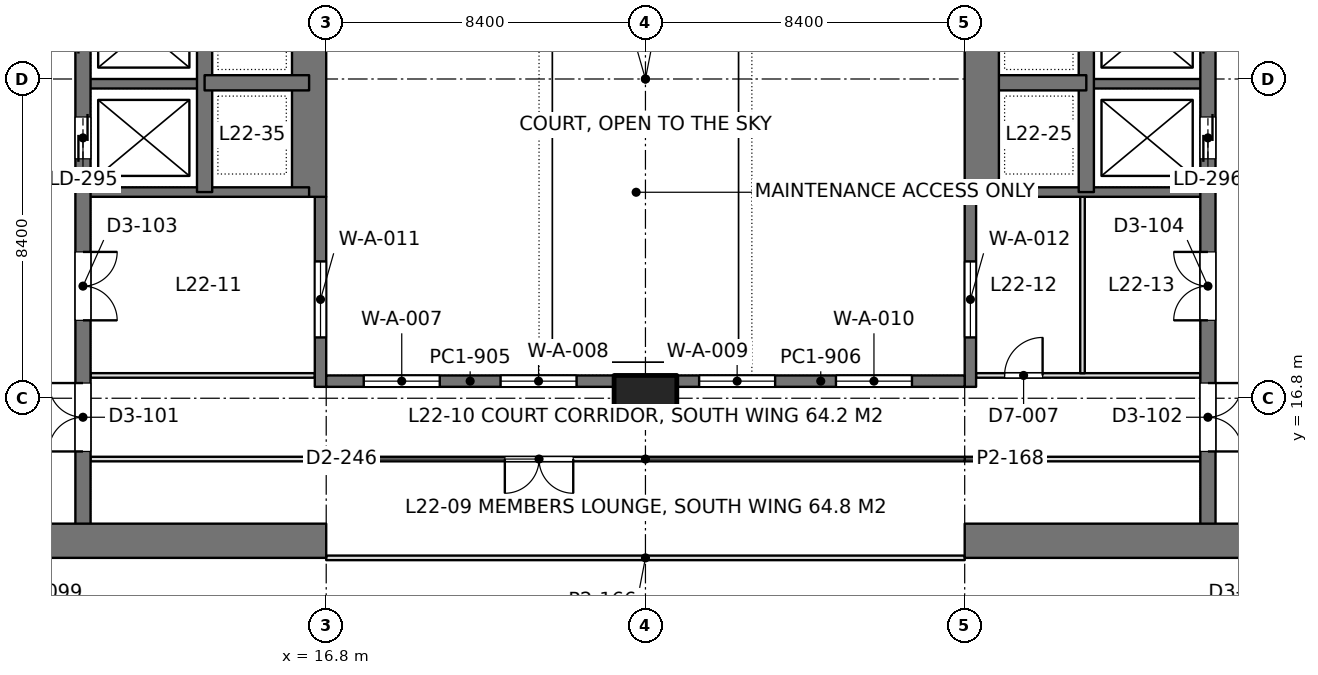
"""IFC4 building model, lengths in metres.
Left out: names, types, materials, properties, quantities, classifications, styles, units other than length and angle.
Written with IfcOpenShell. Run it as: python <this file> out.ifc"""

import sys

from ifc_helpers import new_model, si_unit, direction, frame, frame_2d, origin, origin_2d, place, context, subcontext, project, spatial, rectangle, extrude, element, fill, save


model = new_model("IFC4")
c1 = context("Model", 3, precision=1e-05, world=origin(), true_north=direction((0.0, 1.0)))
c2 = subcontext(c1, "Body", "Model", "MODEL_VIEW")
j1 = project(units=[si_unit("LENGTHUNIT", "METRE"), si_unit("PLANEANGLEUNIT", "RADIAN")], contexts=[c1])
p1 = place(None, origin())
s1 = spatial("IfcSite", under=j1, at=p1, CompositionType="ELEMENT")
p2 = place(p1, origin())
s2 = spatial("IfcBuilding", under=s1, at=p2, CompositionType="ELEMENT")
p3 = place(p2, frame((0.0, 0.0, 100.8)))
s3 = spatial("IfcBuildingStorey", under=s2, at=p3, CompositionType="ELEMENT", Elevation=100.8)
p4 = place(p3, frame((25.2, 16.8, 0.0), z_axis=(0.0, 0.0, 1.0), x_axis=(1.0, 0.0, 0.0)))
e1 = element("IfcColumn", 1, at=p4, inside=s3, PredefinedType="COLUMN", context=c2, shape_type="SweptSolid", body=[
    extrude(rectangle(XDim=1.65, YDim=1.2, at=origin_2d()), origin(), (0.0, 0.0, 1.0), 4.2),
])
p5 = place(p3, frame((-1.2, 13.05, 0.0), z_axis=(0.0, 0.0, 1.0), x_axis=(1.0, 0.0, 0.0)))
e2 = element("IfcWall", 2, at=p5, inside=s3, PredefinedType="SHEAR", context=c2, shape_type="SweptSolid", body=[
    extrude(rectangle(XDim=18.0, YDim=0.9, at=frame_2d((9.0, 0.0))), origin(), (0.0, 0.0, 1.0), 4.2),
])
p6 = place(p5, frame((8.95, 0.0, 0.0)))
e3 = element("IfcOpeningElement", 3, at=p6, cuts=e2, PredefinedType="OPENING", context=c2, shape_type="SweptSolid", body=[
    extrude(rectangle(XDim=1.8, YDim=2.4, at=frame_2d((0.9, 1.2))), frame((0.0, 0.46, 0.0), z_axis=(0.0, -1.0, 0.0), x_axis=(1.0, 0.0, 0.0)), (0.0, 0.0, 1.0), 0.92),
])
p7 = place(p3, frame((16.35, 22.1, 0.0), z_axis=(0.0, 0.0, 1.0), x_axis=(0.0, 1.0, 0.0)))
e4 = element("IfcWall", 4, at=p7, inside=s3, PredefinedType="SHEAR", context=c2, shape_type="SweptSolid", body=[
    extrude(rectangle(XDim=15.25, YDim=0.9, at=frame_2d((7.625, 0.0))), origin(), (0.0, 0.0, 1.0), 4.2),
])
p8 = place(p3, frame((10.4, 13.05, 0.0), z_axis=(0.0, 0.0, 1.0), x_axis=(0.0, 1.0, 0.0)))
e5 = element("IfcWall", 5, at=p8, inside=s3, PredefinedType="SHEAR", context=c2, shape_type="SweptSolid", body=[
    extrude(rectangle(XDim=24.3, YDim=0.4, at=frame_2d((12.15, 0.0))), origin(), (0.0, 0.0, 1.0), 4.2),
])
p9 = place(p8, frame((10.05, 0.0, 0.0)))
e6 = element("IfcOpeningElement", 6, at=p9, cuts=e5, PredefinedType="OPENING", context=c2, shape_type="SweptSolid", body=[
    extrude(rectangle(XDim=1.1, YDim=2.2, at=frame_2d((0.55, 1.1))), frame((0.0, 0.21, 0.0), z_axis=(0.0, -1.0, 0.0), x_axis=(1.0, 0.0, 0.0)), (0.0, 0.0, 1.0), 0.42),
])
p10 = place(p8, frame((12.9, 0.0, 0.0)))
e7 = element("IfcOpeningElement", 7, at=p10, cuts=e5, PredefinedType="OPENING", context=c2, shape_type="SweptSolid", body=[
    extrude(rectangle(XDim=1.1, YDim=2.2, at=frame_2d((0.55, 1.1))), frame((0.0, 0.21, 0.0), z_axis=(0.0, -1.0, 0.0), x_axis=(1.0, 0.0, 0.0)), (0.0, 0.0, 1.0), 0.42),
])
p11 = place(p8, frame((21.45, 0.0, 0.0)))
e8 = element("IfcOpeningElement", 8, at=p11, cuts=e5, PredefinedType="OPENING", context=c2, shape_type="SweptSolid", body=[
    extrude(rectangle(XDim=1.1, YDim=2.2, at=frame_2d((0.55, 1.1))), frame((0.0, 0.21, 0.0), z_axis=(0.0, -1.0, 0.0), x_axis=(1.0, 0.0, 0.0)), (0.0, 0.0, 1.0), 0.42),
])
p12 = place(p8, frame((2.35, 0.0, 0.0)))
e9 = element("IfcOpeningElement", 9, at=p12, cuts=e5, PredefinedType="OPENING", context=c2, shape_type="SweptSolid", body=[
    extrude(rectangle(XDim=1.8, YDim=2.4, at=frame_2d((0.9, 1.2))), frame((0.0, 0.21, 0.0), z_axis=(0.0, -1.0, 0.0), x_axis=(1.0, 0.0, 0.0)), (0.0, 0.0, 1.0), 0.42),
])
p13 = place(p8, frame((5.8, 0.0, 0.0)))
e10 = element("IfcOpeningElement", 10, at=p13, cuts=e5, PredefinedType="OPENING", context=c2, shape_type="SweptSolid", body=[
    extrude(rectangle(XDim=1.8, YDim=2.4, at=frame_2d((0.9, 1.2))), frame((0.0, 0.21, 0.0), z_axis=(0.0, -1.0, 0.0), x_axis=(1.0, 0.0, 0.0)), (0.0, 0.0, 1.0), 0.42),
])
p14 = place(p3, frame((13.6, 22.225, 0.0), z_axis=(0.0, 0.0, 1.0), x_axis=(0.0, 1.0, 0.0)))
e11 = element("IfcWall", 11, at=p14, inside=s3, PredefinedType="SHEAR", context=c2, shape_type="SweptSolid", body=[
    extrude(rectangle(XDim=15.125, YDim=0.4, at=frame_2d((7.562, 0.0))), origin(), (0.0, 0.0, 1.0), 4.2),
])
p15 = place(p3, frame((13.6, 25.1, 0.0), z_axis=(0.0, 0.0, 1.0), x_axis=(1.0, 0.0, 0.0)))
e12 = element("IfcWall", 12, at=p15, inside=s3, PredefinedType="SHEAR", context=c2, shape_type="SweptSolid", body=[
    extrude(rectangle(XDim=2.75, YDim=0.4, at=frame_2d((1.375, 0.0))), origin(), (0.0, 0.0, 1.0), 4.2),
])
p16 = place(p3, frame((10.4, 22.225, 0.0), z_axis=(0.0, 0.0, 1.0), x_axis=(1.0, 0.0, 0.0)))
e13 = element("IfcWall", 13, at=p16, inside=s3, PredefinedType="SHEAR", context=c2, shape_type="SweptSolid", body=[
    extrude(rectangle(XDim=5.95, YDim=0.25, at=frame_2d((2.975, 0.0))), origin(), (0.0, 0.0, 1.0), 4.2),
])
p17 = place(p3, frame((10.4, 25.075, 0.0), z_axis=(0.0, 0.0, 1.0), x_axis=(1.0, 0.0, 0.0)))
e14 = element("IfcWall", 14, at=p17, inside=s3, PredefinedType="SHEAR", context=c2, shape_type="SweptSolid", body=[
    extrude(rectangle(XDim=3.2, YDim=0.25, at=frame_2d((1.6, 0.0))), origin(), (0.0, 0.0, 1.0), 4.2),
])
p18 = place(p3, frame((33.6, 13.05, 0.0), z_axis=(0.0, 0.0, 1.0), x_axis=(1.0, 0.0, 0.0)))
e15 = element("IfcWall", 15, at=p18, inside=s3, PredefinedType="SHEAR", context=c2, shape_type="SweptSolid", body=[
    extrude(rectangle(XDim=18.0, YDim=0.9, at=frame_2d((9.0, 0.0))), origin(), (0.0, 0.0, 1.0), 4.2),
])
p19 = place(p18, frame((7.25, 0.0, 0.0)))
e16 = element("IfcOpeningElement", 16, at=p19, cuts=e15, PredefinedType="OPENING", context=c2, shape_type="SweptSolid", body=[
    extrude(rectangle(XDim=1.8, YDim=2.4, at=frame_2d((0.9, 1.2))), frame((0.0, 0.46, 0.0), z_axis=(0.0, -1.0, 0.0), x_axis=(1.0, 0.0, 0.0)), (0.0, 0.0, 1.0), 0.92),
])
p20 = place(p3, frame((34.05, 22.1, 0.0), z_axis=(0.0, 0.0, 1.0), x_axis=(0.0, 1.0, 0.0)))
e17 = element("IfcWall", 17, at=p20, inside=s3, PredefinedType="SHEAR", context=c2, shape_type="SweptSolid", body=[
    extrude(rectangle(XDim=15.25, YDim=0.9, at=frame_2d((7.625, 0.0))), origin(), (0.0, 0.0, 1.0), 4.2),
])
p21 = place(p3, frame((40.0, 13.05, 0.0), z_axis=(0.0, 0.0, 1.0), x_axis=(0.0, 1.0, 0.0)))
e18 = element("IfcWall", 18, at=p21, inside=s3, PredefinedType="SHEAR", context=c2, shape_type="SweptSolid", body=[
    extrude(rectangle(XDim=24.3, YDim=0.4, at=frame_2d((12.15, 0.0))), origin(), (0.0, 0.0, 1.0), 4.2),
])
p22 = place(p21, frame((10.05, 0.0, 0.0)))
e19 = element("IfcOpeningElement", 19, at=p22, cuts=e18, PredefinedType="OPENING", context=c2, shape_type="SweptSolid", body=[
    extrude(rectangle(XDim=1.1, YDim=2.2, at=frame_2d((0.55, 1.1))), frame((0.0, 0.21, 0.0), z_axis=(0.0, -1.0, 0.0), x_axis=(1.0, 0.0, 0.0)), (0.0, 0.0, 1.0), 0.42),
])
p23 = place(p21, frame((12.9, 0.0, 0.0)))
e20 = element("IfcOpeningElement", 20, at=p23, cuts=e18, PredefinedType="OPENING", context=c2, shape_type="SweptSolid", body=[
    extrude(rectangle(XDim=1.1, YDim=2.2, at=frame_2d((0.55, 1.1))), frame((0.0, 0.21, 0.0), z_axis=(0.0, -1.0, 0.0), x_axis=(1.0, 0.0, 0.0)), (0.0, 0.0, 1.0), 0.42),
])
p24 = place(p21, frame((21.45, 0.0, 0.0)))
e21 = element("IfcOpeningElement", 21, at=p24, cuts=e18, PredefinedType="OPENING", context=c2, shape_type="SweptSolid", body=[
    extrude(rectangle(XDim=1.1, YDim=2.2, at=frame_2d((0.55, 1.1))), frame((0.0, 0.21, 0.0), z_axis=(0.0, -1.0, 0.0), x_axis=(1.0, 0.0, 0.0)), (0.0, 0.0, 1.0), 0.42),
])
p25 = place(p21, frame((2.35, 0.0, 0.0)))
e22 = element("IfcOpeningElement", 22, at=p25, cuts=e18, PredefinedType="OPENING", context=c2, shape_type="SweptSolid", body=[
    extrude(rectangle(XDim=1.8, YDim=2.4, at=frame_2d((0.9, 1.2))), frame((0.0, 0.21, 0.0), z_axis=(0.0, -1.0, 0.0), x_axis=(1.0, 0.0, 0.0)), (0.0, 0.0, 1.0), 0.42),
])
p26 = place(p21, frame((5.8, 0.0, 0.0)))
e23 = element("IfcOpeningElement", 23, at=p26, cuts=e18, PredefinedType="OPENING", context=c2, shape_type="SweptSolid", body=[
    extrude(rectangle(XDim=1.8, YDim=2.4, at=frame_2d((0.9, 1.2))), frame((0.0, 0.21, 0.0), z_axis=(0.0, -1.0, 0.0), x_axis=(1.0, 0.0, 0.0)), (0.0, 0.0, 1.0), 0.42),
])
p27 = place(p3, frame((36.8, 22.225, 0.0), z_axis=(0.0, 0.0, 1.0), x_axis=(0.0, 1.0, 0.0)))
e24 = element("IfcWall", 24, at=p27, inside=s3, PredefinedType="SHEAR", context=c2, shape_type="SweptSolid", body=[
    extrude(rectangle(XDim=15.125, YDim=0.4, at=frame_2d((7.562, 0.0))), origin(), (0.0, 0.0, 1.0), 4.2),
])
p28 = place(p3, frame((36.8, 25.1, 0.0), z_axis=(0.0, 0.0, 1.0), x_axis=(-1.0, 0.0, 0.0)))
e25 = element("IfcWall", 25, at=p28, inside=s3, PredefinedType="SHEAR", context=c2, shape_type="SweptSolid", body=[
    extrude(rectangle(XDim=2.75, YDim=0.4, at=frame_2d((1.375, 0.0))), origin(), (0.0, 0.0, 1.0), 4.2),
])
p29 = place(p3, frame((40.0, 22.225, 0.0), z_axis=(0.0, 0.0, 1.0), x_axis=(-1.0, 0.0, 0.0)))
e26 = element("IfcWall", 26, at=p29, inside=s3, PredefinedType="SHEAR", context=c2, shape_type="SweptSolid", body=[
    extrude(rectangle(XDim=5.95, YDim=0.25, at=frame_2d((2.975, 0.0))), origin(), (0.0, 0.0, 1.0), 4.2),
])
p30 = place(p3, frame((40.0, 25.075, 0.0), z_axis=(0.0, 0.0, 1.0), x_axis=(-1.0, 0.0, 0.0)))
e27 = element("IfcWall", 27, at=p30, inside=s3, PredefinedType="SHEAR", context=c2, shape_type="SweptSolid", body=[
    extrude(rectangle(XDim=3.2, YDim=0.25, at=frame_2d((1.6, 0.0))), origin(), (0.0, 0.0, 1.0), 4.2),
])
p31 = place(p3, frame((16.65, 17.1, 0.0), z_axis=(0.0, 0.0, 1.0), x_axis=(0.0, 1.0, 0.0)))
e28 = element("IfcWall", 28, at=p31, inside=s3, PredefinedType="SOLIDWALL", context=c2, shape_type="SweptSolid", body=[
    extrude(rectangle(XDim=5.0, YDim=0.3, at=frame_2d((2.5, 0.0))), origin(), (0.0, 0.0, 1.0), 4.05),
])
p32 = place(p31, frame((1.3, 0.0, 0.1)))
e29 = element("IfcOpeningElement", 29, at=p32, cuts=e28, PredefinedType="OPENING", context=c2, shape_type="SweptSolid", body=[
    extrude(rectangle(XDim=2.0, YDim=3.0, at=frame_2d((1.0, 1.5))), frame((0.0, 0.16, 0.0), z_axis=(0.0, -1.0, 0.0), x_axis=(1.0, 0.0, 0.0)), (0.0, 0.0, 1.0), 0.32),
])
p33 = place(p3, frame((33.75, 17.1, 0.0), z_axis=(0.0, 0.0, 1.0), x_axis=(0.0, 1.0, 0.0)))
e30 = element("IfcWall", 30, at=p33, inside=s3, PredefinedType="SOLIDWALL", context=c2, shape_type="SweptSolid", body=[
    extrude(rectangle(XDim=5.0, YDim=0.3, at=frame_2d((2.5, 0.0))), origin(), (0.0, 0.0, 1.0), 4.05),
])
p34 = place(p33, frame((1.3, 0.0, 0.1)))
e31 = element("IfcOpeningElement", 31, at=p34, cuts=e30, PredefinedType="OPENING", context=c2, shape_type="SweptSolid", body=[
    extrude(rectangle(XDim=2.0, YDim=3.0, at=frame_2d((1.0, 1.5))), frame((0.0, 0.16, 0.0), z_axis=(0.0, -1.0, 0.0), x_axis=(1.0, 0.0, 0.0)), (0.0, 0.0, 1.0), 0.32),
])
p35 = place(p3, frame((16.8, 17.25, 0.0), z_axis=(0.0, 0.0, 1.0), x_axis=(1.0, 0.0, 0.0)))
e32 = element("IfcWall", 32, at=p35, inside=s3, PredefinedType="SOLIDWALL", context=c2, shape_type="SweptSolid", body=[
    extrude(rectangle(XDim=7.575, YDim=0.3, at=frame_2d((3.788, 0.0))), origin(), (0.0, 0.0, 1.0), 4.05),
])
p36 = place(p35, frame((0.988, 0.0, 0.1)))
e33 = element("IfcOpeningElement", 33, at=p36, cuts=e32, PredefinedType="OPENING", context=c2, shape_type="SweptSolid", body=[
    extrude(rectangle(XDim=2.0, YDim=3.0, at=frame_2d((1.0, 1.5))), frame((0.0, 0.16, 0.0), z_axis=(0.0, -1.0, 0.0), x_axis=(1.0, 0.0, 0.0)), (0.0, 0.0, 1.0), 0.32),
])
p37 = place(p35, frame((4.587, 0.0, 0.1)))
e34 = element("IfcOpeningElement", 34, at=p37, cuts=e32, PredefinedType="OPENING", context=c2, shape_type="SweptSolid", body=[
    extrude(rectangle(XDim=2.0, YDim=3.0, at=frame_2d((1.0, 1.5))), frame((0.0, 0.16, 0.0), z_axis=(0.0, -1.0, 0.0), x_axis=(1.0, 0.0, 0.0)), (0.0, 0.0, 1.0), 0.32),
])
p38 = place(p3, frame((26.025, 17.25, 0.0), z_axis=(0.0, 0.0, 1.0), x_axis=(1.0, 0.0, 0.0)))
e35 = element("IfcWall", 35, at=p38, inside=s3, PredefinedType="SOLIDWALL", context=c2, shape_type="SweptSolid", body=[
    extrude(rectangle(XDim=7.575, YDim=0.3, at=frame_2d((3.788, 0.0))), origin(), (0.0, 0.0, 1.0), 4.05),
])
p39 = place(p38, frame((0.587, 0.0, 0.1)))
e36 = element("IfcOpeningElement", 36, at=p39, cuts=e35, PredefinedType="OPENING", context=c2, shape_type="SweptSolid", body=[
    extrude(rectangle(XDim=2.0, YDim=3.0, at=frame_2d((1.0, 1.5))), frame((0.0, 0.16, 0.0), z_axis=(0.0, -1.0, 0.0), x_axis=(1.0, 0.0, 0.0)), (0.0, 0.0, 1.0), 0.32),
])
p40 = place(p38, frame((4.188, 0.0, 0.1)))
e37 = element("IfcOpeningElement", 37, at=p40, cuts=e35, PredefinedType="OPENING", context=c2, shape_type="SweptSolid", body=[
    extrude(rectangle(XDim=2.0, YDim=3.0, at=frame_2d((1.0, 1.5))), frame((0.0, 0.16, 0.0), z_axis=(0.0, -1.0, 0.0), x_axis=(1.0, 0.0, 0.0)), (0.0, 0.0, 1.0), 0.32),
])
p41 = place(p3, frame((10.598, 17.4, 0.0), z_axis=(0.0, 0.0, 1.0), x_axis=(1.0, 0.0, 0.0)))
e38 = element("IfcWall", 38, at=p41, inside=s3, PredefinedType="PARTITIONING", context=c2, shape_type="SweptSolid", body=[
    extrude(rectangle(XDim=5.904, YDim=0.12, at=frame_2d((2.952, 0.0))), origin(), (0.0, 0.0, 1.0), 3.55),
])
p42 = place(p3, frame((33.898, 17.4, 0.0), z_axis=(0.0, 0.0, 1.0), x_axis=(1.0, 0.0, 0.0)))
e39 = element("IfcWall", 39, at=p42, inside=s3, PredefinedType="PARTITIONING", context=c2, shape_type="SweptSolid", body=[
    extrude(rectangle(XDim=5.904, YDim=0.12, at=frame_2d((2.952, 0.0))), origin(), (0.0, 0.0, 1.0), 3.55),
])
p43 = place(p42, frame((0.752, 0.0, 0.0)))
e40 = element("IfcOpeningElement", 40, at=p43, cuts=e39, PredefinedType="OPENING", context=c2, shape_type="SweptSolid", body=[
    extrude(rectangle(XDim=1.0, YDim=2.4, at=frame_2d((0.5, 1.2))), frame((0.0, 0.07, 0.0), z_axis=(0.0, -1.0, 0.0), x_axis=(1.0, 0.0, 0.0)), (0.0, 0.0, 1.0), 0.14),
])
p44 = place(p3, frame((36.7, 17.458, 0.0), z_axis=(0.0, 0.0, 1.0), x_axis=(0.0, 1.0, 0.0)))
e41 = element("IfcWall", 41, at=p44, inside=s3, PredefinedType="PARTITIONING", context=c2, shape_type="SweptSolid", body=[
    extrude(rectangle(XDim=4.644, YDim=0.12, at=frame_2d((2.322, 0.0))), origin(), (0.0, 0.0, 1.0), 3.6),
])
for number, where, z_axis, x_axis in (
    (42, (10.598, 15.2, 0.0), (0.0, 0.0, 1.0), (1.0, 0.0, 0.0)),
    (43, (33.598, 15.2, 0.0), (0.0, 0.0, 1.0), (1.0, 0.0, 0.0)),
):
    element("IfcWall", number, at=place(p3, frame(where, z_axis=z_axis, x_axis=x_axis)), inside=s3, PredefinedType="PARTITIONING", context=c2, shape_type="SweptSolid", body=[
        extrude(rectangle(XDim=6.204, YDim=0.12, at=frame_2d((3.102, 0.0))), origin(), (0.0, 0.0, 1.0), 3.55),
    ])
p45 = place(p3, frame((16.798, 15.2, 0.0), z_axis=(0.0, 0.0, 1.0), x_axis=(1.0, 0.0, 0.0)))
e44 = element("IfcWall", 44, at=p45, inside=s3, PredefinedType="PARTITIONING", context=c2, shape_type="SweptSolid", body=[
    extrude(rectangle(XDim=16.804, YDim=0.12, at=frame_2d((8.402, 0.0))), origin(), (0.0, 0.0, 1.0), 3.55),
])
p46 = place(p45, frame((4.702, 0.0, 0.0)))
e45 = element("IfcOpeningElement", 45, at=p46, cuts=e44, PredefinedType="OPENING", context=c2, shape_type="SweptSolid", body=[
    extrude(rectangle(XDim=1.8, YDim=2.2, at=frame_2d((0.9, 1.1))), frame((0.0, 0.07, 0.0), z_axis=(0.0, -1.0, 0.0), x_axis=(1.0, 0.0, 0.0)), (0.0, 0.0, 1.0), 0.14),
])
p47 = place(p3, frame((16.8, 12.6, 0.0), z_axis=(0.0, 0.0, 1.0), x_axis=(1.0, 0.0, 0.0)))
e46 = element("IfcWall", 46, at=p47, inside=s3, PredefinedType="PARTITIONING", context=c2, shape_type="SweptSolid", body=[
    extrude(rectangle(XDim=16.8, YDim=0.12, at=frame_2d((8.4, 0.0))), origin(), (0.0, 0.0, 1.0), 3.55),
])
p48 = place(p32, origin())
e47 = element("IfcWindow", 47, at=p48, inside=s3, PartitioningType="SINGLE_PANEL", PredefinedType="WINDOW", context=c2, shape_type="SweptSolid", body=[
    extrude(rectangle(XDim=2.0, YDim=3.0, at=frame_2d((1.0, 1.5))), frame((0.0, 0.03, 0.0), z_axis=(0.0, -1.0, 0.0), x_axis=(1.0, 0.0, 0.0)), (0.0, 0.0, 1.0), 0.06),
])
fill(e29, e47)
p49 = place(p34, origin())
e48 = element("IfcWindow", 48, at=p49, inside=s3, PartitioningType="SINGLE_PANEL", PredefinedType="WINDOW", context=c2, shape_type="SweptSolid", body=[
    extrude(rectangle(XDim=2.0, YDim=3.0, at=frame_2d((1.0, 1.5))), frame((0.0, 0.03, 0.0), z_axis=(0.0, -1.0, 0.0), x_axis=(1.0, 0.0, 0.0)), (0.0, 0.0, 1.0), 0.06),
])
fill(e31, e48)
p50 = place(p36, origin())
e49 = element("IfcWindow", 49, at=p50, inside=s3, PartitioningType="SINGLE_PANEL", PredefinedType="WINDOW", context=c2, shape_type="SweptSolid", body=[
    extrude(rectangle(XDim=2.0, YDim=3.0, at=frame_2d((1.0, 1.5))), frame((0.0, 0.03, 0.0), z_axis=(0.0, -1.0, 0.0), x_axis=(1.0, 0.0, 0.0)), (0.0, 0.0, 1.0), 0.06),
])
fill(e33, e49)
p51 = place(p37, origin())
e50 = element("IfcWindow", 50, at=p51, inside=s3, PartitioningType="SINGLE_PANEL", PredefinedType="WINDOW", context=c2, shape_type="SweptSolid", body=[
    extrude(rectangle(XDim=2.0, YDim=3.0, at=frame_2d((1.0, 1.5))), frame((0.0, 0.03, 0.0), z_axis=(0.0, -1.0, 0.0), x_axis=(1.0, 0.0, 0.0)), (0.0, 0.0, 1.0), 0.06),
])
fill(e34, e50)
p52 = place(p39, origin())
e51 = element("IfcWindow", 51, at=p52, inside=s3, PartitioningType="SINGLE_PANEL", PredefinedType="WINDOW", context=c2, shape_type="SweptSolid", body=[
    extrude(rectangle(XDim=2.0, YDim=3.0, at=frame_2d((1.0, 1.5))), frame((0.0, 0.03, 0.0), z_axis=(0.0, -1.0, 0.0), x_axis=(1.0, 0.0, 0.0)), (0.0, 0.0, 1.0), 0.06),
])
fill(e36, e51)
p53 = place(p40, origin())
e52 = element("IfcWindow", 52, at=p53, inside=s3, PartitioningType="SINGLE_PANEL", PredefinedType="WINDOW", context=c2, shape_type="SweptSolid", body=[
    extrude(rectangle(XDim=2.0, YDim=3.0, at=frame_2d((1.0, 1.5))), frame((0.0, 0.03, 0.0), z_axis=(0.0, -1.0, 0.0), x_axis=(1.0, 0.0, 0.0)), (0.0, 0.0, 1.0), 0.06),
])
fill(e37, e52)
p54 = place(p9, origin())
e53 = element("IfcDoor", 53, at=p54, inside=s3, OperationType="DOUBLE_DOOR_SLIDING", PredefinedType="DOOR", context=c2, shape_type="SweptSolid", body=[
    extrude(rectangle(XDim=1.1, YDim=2.2, at=frame_2d((0.55, 1.1))), frame((0.0, 0.025, 0.0), z_axis=(0.0, -1.0, 0.0), x_axis=(1.0, 0.0, 0.0)), (0.0, 0.0, 1.0), 0.05),
])
fill(e6, e53)
p55 = place(p12, origin())
e54 = element("IfcDoor", 54, at=p55, inside=s3, OperationType="DOUBLE_DOOR_SINGLE_SWING", PredefinedType="DOOR", context=c2, shape_type="SweptSolid", body=[
    extrude(rectangle(XDim=1.8, YDim=2.4, at=frame_2d((0.9, 1.2))), frame((0.0, 0.025, 0.0), z_axis=(0.0, -1.0, 0.0), x_axis=(1.0, 0.0, 0.0)), (0.0, 0.0, 1.0), 0.05),
])
fill(e9, e54)
p56 = place(p13, frame((1.8, 0.0, 0.0), z_axis=(0.0, 0.0, 1.0), x_axis=(-1.0, 0.0, 0.0)))
e55 = element("IfcDoor", 55, at=p56, inside=s3, OperationType="DOUBLE_DOOR_SINGLE_SWING", PredefinedType="DOOR", context=c2, shape_type="SweptSolid", body=[
    extrude(rectangle(XDim=1.8, YDim=2.4, at=frame_2d((0.9, 1.2))), frame((0.0, 0.025, 0.0), z_axis=(0.0, -1.0, 0.0), x_axis=(1.0, 0.0, 0.0)), (0.0, 0.0, 1.0), 0.05),
])
fill(e10, e55)
p57 = place(p22, origin())
e56 = element("IfcDoor", 56, at=p57, inside=s3, OperationType="DOUBLE_DOOR_SLIDING", PredefinedType="DOOR", context=c2, shape_type="SweptSolid", body=[
    extrude(rectangle(XDim=1.1, YDim=2.2, at=frame_2d((0.55, 1.1))), frame((0.0, 0.025, 0.0), z_axis=(0.0, -1.0, 0.0), x_axis=(1.0, 0.0, 0.0)), (0.0, 0.0, 1.0), 0.05),
])
fill(e19, e56)
p58 = place(p25, frame((1.8, 0.0, 0.0), z_axis=(0.0, 0.0, 1.0), x_axis=(-1.0, 0.0, 0.0)))
e57 = element("IfcDoor", 57, at=p58, inside=s3, OperationType="DOUBLE_DOOR_SINGLE_SWING", PredefinedType="DOOR", context=c2, shape_type="SweptSolid", body=[
    extrude(rectangle(XDim=1.8, YDim=2.4, at=frame_2d((0.9, 1.2))), frame((0.0, 0.025, 0.0), z_axis=(0.0, -1.0, 0.0), x_axis=(1.0, 0.0, 0.0)), (0.0, 0.0, 1.0), 0.05),
])
fill(e22, e57)
p59 = place(p26, origin())
e58 = element("IfcDoor", 58, at=p59, inside=s3, OperationType="DOUBLE_DOOR_SINGLE_SWING", PredefinedType="DOOR", context=c2, shape_type="SweptSolid", body=[
    extrude(rectangle(XDim=1.8, YDim=2.4, at=frame_2d((0.9, 1.2))), frame((0.0, 0.025, 0.0), z_axis=(0.0, -1.0, 0.0), x_axis=(1.0, 0.0, 0.0)), (0.0, 0.0, 1.0), 0.05),
])
fill(e23, e58)
p60 = place(p43, origin())
e59 = element("IfcDoor", 59, at=p60, inside=s3, OperationType="SINGLE_SWING_RIGHT", PredefinedType="DOOR", context=c2, shape_type="SweptSolid", body=[
    extrude(rectangle(XDim=1.0, YDim=2.4, at=frame_2d((0.5, 1.2))), frame((0.0, 0.025, 0.0), z_axis=(0.0, -1.0, 0.0), x_axis=(1.0, 0.0, 0.0)), (0.0, 0.0, 1.0), 0.05),
])
fill(e40, e59)
p61 = place(p46, frame((1.8, 0.0, 0.0), z_axis=(0.0, 0.0, 1.0), x_axis=(-1.0, 0.0, 0.0)))
e60 = element("IfcDoor", 60, at=p61, inside=s3, OperationType="DOUBLE_DOOR_SINGLE_SWING", PredefinedType="DOOR", context=c2, shape_type="SweptSolid", body=[
    extrude(rectangle(XDim=1.8, YDim=2.2, at=frame_2d((0.9, 1.1))), frame((0.0, 0.025, 0.0), z_axis=(0.0, -1.0, 0.0), x_axis=(1.0, 0.0, 0.0)), (0.0, 0.0, 1.0), 0.05),
])
fill(e45, e60)
save(model, sys.argv[1])
